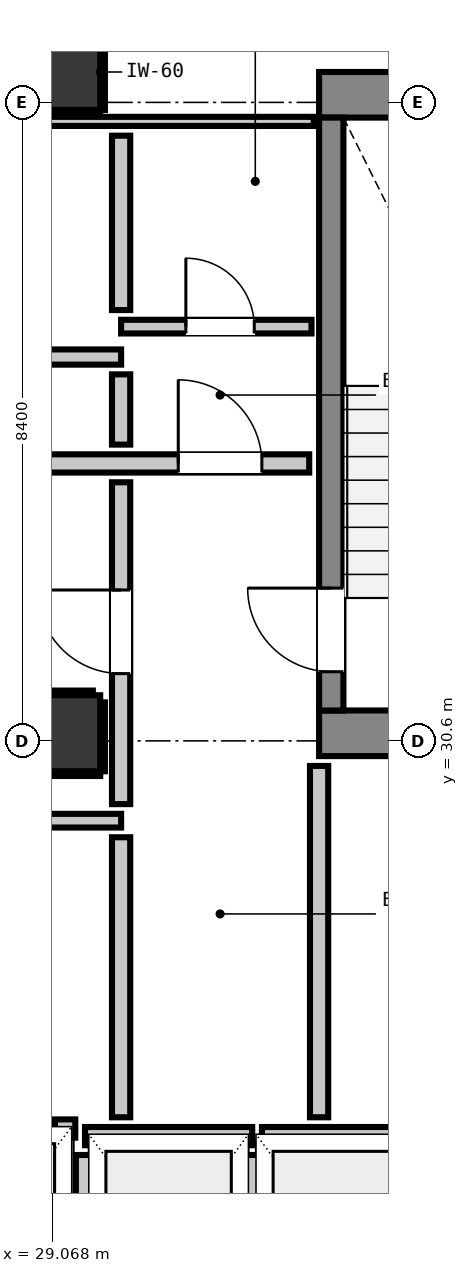
"""IFC4 building model, lengths in metres.
Left out: names, types, materials, properties, quantities, classifications, styles, units other than length and angle.
Written with IfcOpenShell. Run it as: python <this file> out.ifc"""

import sys

from ifc_helpers import new_model, si_unit, direction, frame, frame_2d, origin, origin_2d, place, context, subcontext, project, spatial, rectangle, extrude, element, fill, save


model = new_model("IFC4")
c1 = context("Model", 3, precision=1e-05, world=origin(), true_north=direction((0.0, 1.0)))
c2 = subcontext(c1, "Body", "Model", "MODEL_VIEW")
j1 = project(units=[si_unit("LENGTHUNIT", "METRE"), si_unit("PLANEANGLEUNIT", "RADIAN")], contexts=[c1])
p1 = place(None, origin())
s1 = spatial("IfcSite", under=j1, at=p1, CompositionType="ELEMENT")
p2 = place(p1, origin())
s2 = spatial("IfcBuilding", under=s1, at=p2, CompositionType="ELEMENT")
p3 = place(p2, frame((0.0, 0.0, 162.52)))
s3 = spatial("IfcBuildingStorey", under=s2, at=p3, CompositionType="ELEMENT", Elevation=162.52)
p4 = place(p3, frame((29.2, 39.4, 0.0), z_axis=(0.0, 0.0, 1.0), x_axis=(1.0, 0.0, 0.0)))
e1 = element("IfcColumn", 1, at=p4, inside=s3, PredefinedType="COLUMN", context=c2, shape_type="SweptSolid", body=[
    extrude(rectangle(XDim=1.0, YDim=1.0, at=origin_2d()), origin(), (0.0, 0.0, 1.0), 3.32),
])
p5 = place(p3, frame((32.58, 39.1, 0.0), z_axis=(0.0, 0.0, 1.0), x_axis=(1.0, 0.0, 0.0)))
e2 = element("IfcWall", 2, at=p5, inside=s3, PredefinedType="SHEAR", context=c2, shape_type="SweptSolid", body=[
    extrude(rectangle(XDim=4.08, YDim=0.6, at=frame_2d((2.04, 0.0))), origin(), (0.0, 0.0, 1.0), 3.32),
])
p6 = place(p3, frame((32.58, 30.7, 0.0), z_axis=(0.0, 0.0, 1.0), x_axis=(1.0, 0.0, 0.0)))
e3 = element("IfcWall", 3, at=p6, inside=s3, PredefinedType="SHEAR", context=c2, shape_type="SweptSolid", body=[
    extrude(rectangle(XDim=3.415, YDim=0.6, at=frame_2d((1.708, 0.0))), origin(), (0.0, 0.0, 1.0), 3.32),
])
p7 = place(p3, frame((32.74, 31.0, 0.0), z_axis=(0.0, 0.0, 1.0), x_axis=(0.0, 1.0, 0.0)))
e4 = element("IfcWall", 4, at=p7, inside=s3, PredefinedType="SHEAR", context=c2, shape_type="SweptSolid", body=[
    extrude(rectangle(XDim=7.8, YDim=0.32, at=frame_2d((3.9, 0.0))), origin(), (0.0, 0.0, 1.0), 3.32),
])
p8 = place(p7, frame((0.51, 0.0, 0.0)))
e5 = element("IfcOpeningElement", 5, at=p8, cuts=e4, PredefinedType="OPENING", context=c2, shape_type="SweptSolid", body=[
    extrude(rectangle(XDim=1.1, YDim=2.15, at=frame_2d((0.55, 1.075))), frame((0.0, 0.17, 0.0), z_axis=(0.0, -1.0, 0.0), x_axis=(1.0, 0.0, 0.0)), (0.0, 0.0, 1.0), 0.34),
])
p9 = place(p3, frame((29.2, 30.7, 0.0), z_axis=(0.0, 0.0, 1.0), x_axis=(1.0, 0.0, 0.0)))
e6 = element("IfcColumn", 6, at=p9, inside=s3, PredefinedType="COLUMN", context=c2, shape_type="SweptSolid", body=[
    extrude(rectangle(XDim=1.0, YDim=1.0, at=origin_2d()), origin(), (0.0, 0.0, 1.0), 3.32),
])
p10 = place(p3, frame((29.5, 25.4, 0.0), z_axis=(0.0, 0.0, 1.0), x_axis=(1.0, 0.0, 0.0)))
e7 = element("IfcWall", 7, at=p10, inside=s3, PredefinedType="PARTITIONING", context=c2, shape_type="SweptSolid", body=[
    extrude(rectangle(XDim=2.2, YDim=0.24, at=frame_2d((1.1, 0.0))), origin(), (0.0, 0.0, 1.0), 2.9),
])
p11 = place(p3, frame((29.5, 22.632, 0.0), z_axis=(0.0, 0.0, 1.0), x_axis=(0.0, 1.0, 0.0)))
e8 = element("IfcWall", 8, at=p11, inside=s3, PredefinedType="PARTITIONING", context=c2, shape_type="SweptSolid", body=[
    extrude(rectangle(XDim=2.52, YDim=0.24, at=frame_2d((1.26, 0.0))), origin(), (0.0, 0.0, 1.0), 0.905),
])
p12 = place(p3, frame((31.7, 22.63, 0.0), z_axis=(0.0, 0.0, 1.0), x_axis=(0.0, 1.0, 0.0)))
e9 = element("IfcWall", 9, at=p12, inside=s3, PredefinedType="PARTITIONING", context=c2, shape_type="SweptSolid", body=[
    extrude(rectangle(XDim=2.522, YDim=0.24, at=frame_2d((1.261, 0.0))), origin(), (0.0, 0.0, 1.0), 2.9),
])
p13 = place(p3, frame((31.828, 25.4, 0.0), z_axis=(0.0, 0.0, 1.0), x_axis=(1.0, 0.0, 0.0)))
e10 = element("IfcWall", 10, at=p13, inside=s3, PredefinedType="PARTITIONING", context=c2, shape_type="SweptSolid", body=[
    extrude(rectangle(XDim=2.072, YDim=0.24, at=frame_2d((1.036, 0.0))), origin(), (0.0, 0.0, 1.0), 2.9),
])
p14 = place(p3, frame((29.103, 25.5, 0.0), z_axis=(0.0, 0.0, 1.0), x_axis=(1.0, 0.0, 0.0)))
e11 = element("IfcWall", 11, at=p14, inside=s3, PredefinedType="PARTITIONING", context=c2, shape_type="SweptSolid", body=[
    extrude(rectangle(XDim=0.269, YDim=0.24, at=frame_2d((0.135, 0.0))), origin(), (0.0, 0.0, 1.0), 2.9),
])
p15 = place(p3, frame((28.702, 34.25, 0.0), z_axis=(0.0, 0.0, 1.0), x_axis=(1.0, 0.0, 0.0)))
e12 = element("IfcWall", 12, at=p15, inside=s3, PredefinedType="PARTITIONING", context=c2, shape_type="SweptSolid", body=[
    extrude(rectangle(XDim=3.748, YDim=0.24, at=frame_2d((1.874, 0.0))), origin(), (0.0, 0.0, 1.0), 2.9),
])
p16 = place(p15, frame((2.025, 0.0, 0.0)))
e13 = element("IfcOpeningElement", 13, at=p16, cuts=e12, PredefinedType="OPENING", context=c2, shape_type="SweptSolid", body=[
    extrude(rectangle(XDim=1.1, YDim=2.15, at=frame_2d((0.55, 1.075))), frame((0.0, 0.13, 0.0), z_axis=(0.0, -1.0, 0.0), x_axis=(1.0, 0.0, 0.0)), (0.0, 0.0, 1.0), 0.26),
])
p17 = place(p3, frame((18.95, 35.65, 0.0), z_axis=(0.0, 0.0, 1.0), x_axis=(1.0, 0.0, 0.0)))
e14 = element("IfcWall", 14, at=p17, inside=s3, PredefinedType="PARTITIONING", context=c2, shape_type="SweptSolid", body=[
    extrude(rectangle(XDim=11.025, YDim=0.2, at=frame_2d((5.513, 0.0))), origin(), (0.0, 0.0, 1.0), 2.9),
])
p18 = place(p3, frame((20.65, 29.55, 0.0), z_axis=(0.0, 0.0, 1.0), x_axis=(1.0, 0.0, 0.0)))
e15 = element("IfcWall", 15, at=p18, inside=s3, PredefinedType="PARTITIONING", context=c2, shape_type="SweptSolid", body=[
    extrude(rectangle(XDim=9.325, YDim=0.18, at=frame_2d((4.663, 0.0))), origin(), (0.0, 0.0, 1.0), 2.9),
])
p19 = place(p3, frame((29.975, 36.05, 0.0), z_axis=(0.0, 0.0, 1.0), x_axis=(1.0, 0.0, 0.0)))
e16 = element("IfcWall", 16, at=p19, inside=s3, PredefinedType="PARTITIONING", context=c2, shape_type="SweptSolid", body=[
    extrude(rectangle(XDim=2.505, YDim=0.18, at=frame_2d((1.252, 0.0))), origin(), (0.0, 0.0, 1.0), 2.9),
])
p20 = place(p19, frame((0.852, 0.0, 0.0)))
e17 = element("IfcOpeningElement", 17, at=p20, cuts=e16, PredefinedType="OPENING", context=c2, shape_type="SweptSolid", body=[
    extrude(rectangle(XDim=0.9, YDim=2.1, at=frame_2d((0.45, 1.05))), frame((0.0, 0.1, 0.0), z_axis=(0.0, -1.0, 0.0), x_axis=(1.0, 0.0, 0.0)), (0.0, 0.0, 1.0), 0.2),
])
p21 = place(p3, frame((18.95, 38.75, 0.0), z_axis=(0.0, 0.0, 1.0), x_axis=(1.0, 0.0, 0.0)))
e18 = element("IfcWall", 18, at=p21, inside=s3, PredefinedType="PARTITIONING", context=c2, shape_type="SweptSolid", body=[
    extrude(rectangle(XDim=13.56, YDim=0.12, at=frame_2d((6.78, 0.0))), origin(), (0.0, 0.0, 1.0), 0.905),
])
p22 = place(p3, frame((29.975, 25.648, 0.0), z_axis=(0.0, 0.0, 1.0), x_axis=(0.0, 1.0, 0.0)))
e19 = element("IfcWall", 19, at=p22, inside=s3, PredefinedType="PARTITIONING", context=c2, shape_type="SweptSolid", body=[
    extrude(rectangle(XDim=3.684, YDim=0.24, at=frame_2d((1.842, 0.0))), origin(), (0.0, 0.0, 1.0), 2.9),
])
p23 = place(p3, frame((29.975, 29.768, 0.0), z_axis=(0.0, 0.0, 1.0), x_axis=(0.0, 1.0, 0.0)))
e20 = element("IfcWall", 20, at=p23, inside=s3, PredefinedType="PARTITIONING", context=c2, shape_type="SweptSolid", body=[
    extrude(rectangle(XDim=4.234, YDim=0.24, at=frame_2d((2.117, 0.0))), origin(), (0.0, 0.0, 1.0), 2.9),
])
p24 = place(p23, frame((1.717, 0.0, 0.0)))
e21 = element("IfcOpeningElement", 21, at=p24, cuts=e20, PredefinedType="OPENING", context=c2, shape_type="SweptSolid", body=[
    extrude(rectangle(XDim=1.1, YDim=2.15, at=frame_2d((0.55, 1.075))), frame((0.0, 0.13, 0.0), z_axis=(0.0, -1.0, 0.0), x_axis=(1.0, 0.0, 0.0)), (0.0, 0.0, 1.0), 0.26),
])
p25 = place(p3, frame((29.975, 34.498, 0.0), z_axis=(0.0, 0.0, 1.0), x_axis=(0.0, 1.0, 0.0)))
e22 = element("IfcWall", 22, at=p25, inside=s3, PredefinedType="PARTITIONING", context=c2, shape_type="SweptSolid", body=[
    extrude(rectangle(XDim=0.924, YDim=0.24, at=frame_2d((0.462, 0.0))), origin(), (0.0, 0.0, 1.0), 2.9),
])
p26 = place(p3, frame((29.975, 36.268, 0.0), z_axis=(0.0, 0.0, 1.0), x_axis=(0.0, 1.0, 0.0)))
e23 = element("IfcWall", 23, at=p26, inside=s3, PredefinedType="PARTITIONING", context=c2, shape_type="SweptSolid", body=[
    extrude(rectangle(XDim=2.294, YDim=0.24, at=frame_2d((1.147, 0.0))), origin(), (0.0, 0.0, 1.0), 2.9),
])
p27 = place(p3, frame((32.58, 25.648, 0.0), z_axis=(0.0, 0.0, 1.0), x_axis=(0.0, 1.0, 0.0)))
e24 = element("IfcWall", 24, at=p27, inside=s3, PredefinedType="PARTITIONING", context=c2, shape_type="SweptSolid", body=[
    extrude(rectangle(XDim=4.622, YDim=0.24, at=frame_2d((2.311, 0.0))), origin(), (0.0, 0.0, 1.0), 2.9),
])
for number, where, z_axis, x_axis in (
    (25, (28.7, 38.868, 0.0), (0.0, 0.0, 1.0), (1.0, 0.0, 0.0)),
    (26, (29.732, 38.9, 0.0), (0.0, 0.0, 1.0), (0.0, 1.0, 0.0)),
    (27, (28.7, 30.168, 0.0), (0.0, 0.0, 1.0), (1.0, 0.0, 0.0)),
):
    element("IfcWall", number, at=place(p3, frame(where, z_axis=z_axis, x_axis=x_axis)), inside=s3, PredefinedType="PARTITIONING", context=c2, shape_type="SweptSolid", body=[
        extrude(rectangle(XDim=1.0, YDim=0.06, at=frame_2d((0.5, 0.0))), origin(), (0.0, 0.0, 1.0), 0.905),
    ])
p28 = place(p3, frame((28.7, 31.232, 0.0), z_axis=(0.0, 0.0, 1.0), x_axis=(1.0, 0.0, 0.0)))
e28 = element("IfcWall", 28, at=p28, inside=s3, PredefinedType="PARTITIONING", context=c2, shape_type="SweptSolid", body=[
    extrude(rectangle(XDim=0.903, YDim=0.06, at=frame_2d((0.452, 0.0))), origin(), (0.0, 0.0, 1.0), 0.905),
])
p29 = place(p3, frame((29.732, 30.2, 0.0), z_axis=(0.0, 0.0, 1.0), x_axis=(0.0, 1.0, 0.0)))
e29 = element("IfcWall", 29, at=p29, inside=s3, PredefinedType="PARTITIONING", context=c2, shape_type="SweptSolid", body=[
    extrude(rectangle(XDim=0.907, YDim=0.06, at=frame_2d((0.454, 0.0))), origin(), (0.0, 0.0, 1.0), 0.905),
])
p30 = place(p8, origin())
e30 = element("IfcDoor", 30, at=p30, inside=s3, OperationType="SINGLE_SWING_RIGHT", PredefinedType="DOOR", context=c2, shape_type="SweptSolid", body=[
    extrude(rectangle(XDim=1.1, YDim=2.15, at=frame_2d((0.55, 1.075))), frame((0.0, 0.025, 0.0), z_axis=(0.0, -1.0, 0.0), x_axis=(1.0, 0.0, 0.0)), (0.0, 0.0, 1.0), 0.05),
])
fill(e5, e30)
p31 = place(p24, origin())
e31 = element("IfcDoor", 31, at=p31, inside=s3, OperationType="SINGLE_SWING_RIGHT", PredefinedType="DOOR", context=c2, shape_type="SweptSolid", body=[
    extrude(rectangle(XDim=1.1, YDim=2.15, at=frame_2d((0.55, 1.075))), frame((0.0, 0.025, 0.0), z_axis=(0.0, -1.0, 0.0), x_axis=(1.0, 0.0, 0.0)), (0.0, 0.0, 1.0), 0.05),
])
fill(e21, e31)
p32 = place(p16, origin())
e32 = element("IfcDoor", 32, at=p32, inside=s3, OperationType="SINGLE_SWING_LEFT", PredefinedType="DOOR", context=c2, shape_type="SweptSolid", body=[
    extrude(rectangle(XDim=1.1, YDim=2.15, at=frame_2d((0.55, 1.075))), frame((0.0, 0.025, 0.0), z_axis=(0.0, -1.0, 0.0), x_axis=(1.0, 0.0, 0.0)), (0.0, 0.0, 1.0), 0.05),
])
fill(e13, e32)
p33 = place(p20, origin())
e33 = element("IfcDoor", 33, at=p33, inside=s3, OperationType="SINGLE_SWING_LEFT", PredefinedType="DOOR", context=c2, shape_type="SweptSolid", body=[
    extrude(rectangle(XDim=0.9, YDim=2.1, at=frame_2d((0.45, 1.05))), frame((0.0, 0.025, 0.0), z_axis=(0.0, -1.0, 0.0), x_axis=(1.0, 0.0, 0.0)), (0.0, 0.0, 1.0), 0.05),
])
fill(e17, e33)
save(model, sys.argv[1])
